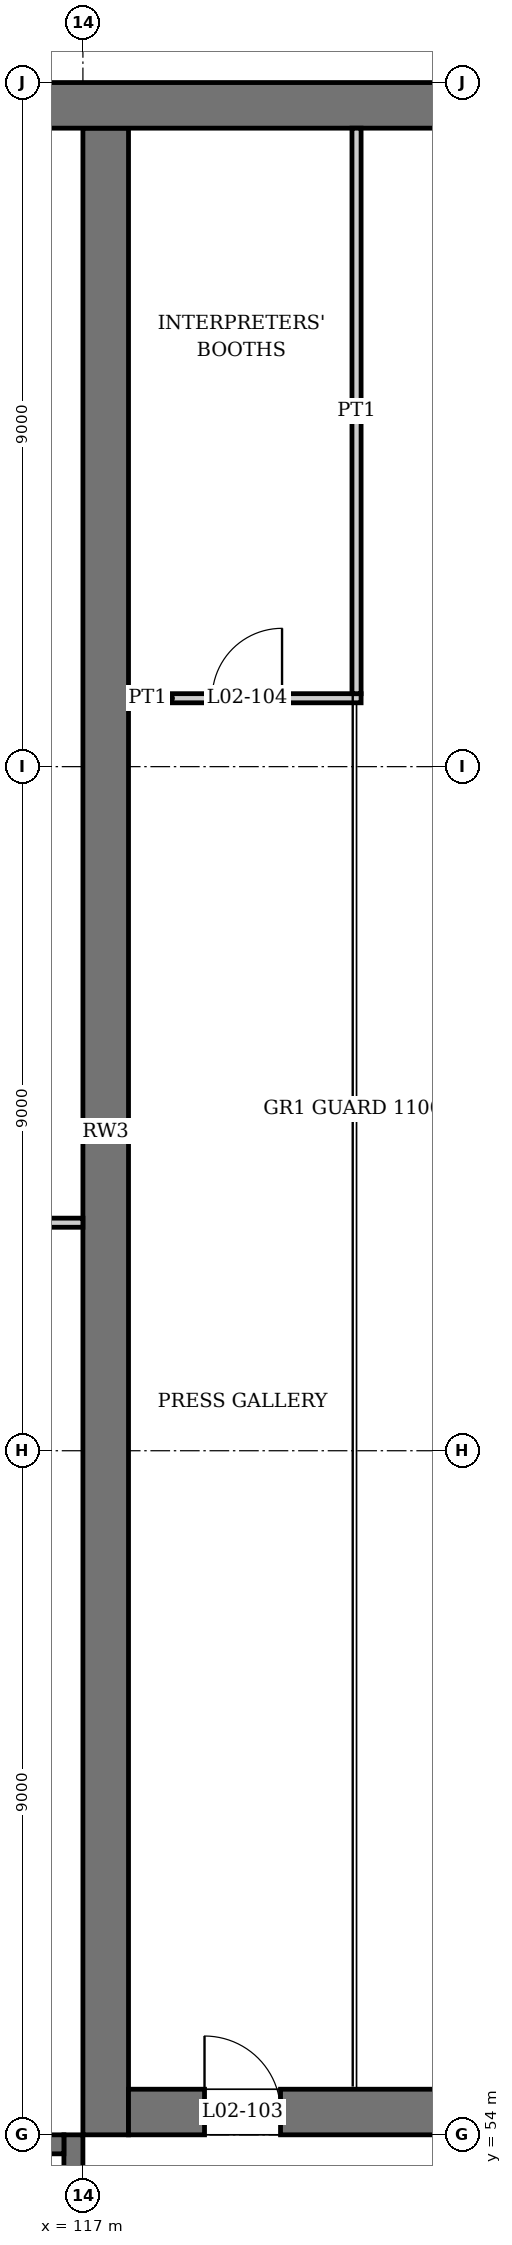
"""IFC4 building model, lengths in metres.
Left out: names, types, materials, properties, quantities, classifications, styles, units other than length and angle.
Written with IfcOpenShell. Run it as: python <this file> out.ifc"""

import sys

from ifc_helpers import new_model, si_unit, direction, frame, frame_2d, origin, place, context, subcontext, project, spatial, rectangle, extrude, element, fill, save


model = new_model("IFC4")
c1 = context("Model", 3, precision=1e-05, world=origin(), true_north=direction((0.0, 1.0)))
c2 = subcontext(c1, "Body", "Model", "MODEL_VIEW")
j1 = project(units=[si_unit("LENGTHUNIT", "METRE"), si_unit("PLANEANGLEUNIT", "RADIAN")], contexts=[c1])
p1 = place(None, origin())
s1 = spatial("IfcSite", under=j1, at=p1, CompositionType="ELEMENT")
p2 = place(p1, origin())
s2 = spatial("IfcBuilding", under=s1, at=p2, CompositionType="ELEMENT")
p3 = place(p2, frame((0.0, 0.0, 10.5)))
s3 = spatial("IfcBuildingStorey", under=s2, at=p3, CompositionType="ELEMENT", Elevation=10.5)
p4 = place(p3, frame((116.875, 45.0, 0.0), z_axis=(0.0, 0.0, 1.0), x_axis=(0.0, 1.0, 0.0)))
e1 = element("IfcWall", 1, at=p4, inside=s3, PredefinedType="SHEAR", context=c2, shape_type="SweptSolid", body=[
    extrude(rectangle(XDim=9.0, YDim=0.25, at=frame_2d((4.5, 0.0))), origin(), (0.0, 0.0, 1.0), 4.35),
])
p5 = place(p4, frame((1.75, 0.0, 0.0)))
e2 = element("IfcOpeningElement", 2, at=p5, cuts=e1, PredefinedType="OPENING", context=c2, shape_type="SweptSolid", body=[
    extrude(rectangle(XDim=1.0, YDim=2.1, at=frame_2d((0.5, 1.05))), frame((0.0, 0.135, 0.0), z_axis=(0.0, -1.0, 0.0), x_axis=(1.0, 0.0, 0.0)), (0.0, 0.0, 1.0), 0.27),
])
p6 = place(p3, frame((108.25, 53.875, 0.0), z_axis=(0.0, 0.0, 1.0), x_axis=(1.0, 0.0, 0.0)))
e3 = element("IfcWall", 3, at=p6, inside=s3, PredefinedType="SHEAR", context=c2, shape_type="SweptSolid", body=[
    extrude(rectangle(XDim=8.5, YDim=0.25, at=frame_2d((4.25, 0.0))), origin(), (0.0, 0.0, 1.0), 4.35),
])
p7 = place(p3, frame((117.3, 54.0, 0.0), z_axis=(0.0, 0.0, 1.0), x_axis=(0.0, 1.0, 0.0)))
e4 = element("IfcWall", 4, at=p7, inside=s3, PredefinedType="SHEAR", context=c2, shape_type="SweptSolid", body=[
    extrude(rectangle(XDim=26.4, YDim=0.6, at=frame_2d((13.2, 0.0))), origin(), (0.0, 0.0, 1.0), 4.5),
])
p8 = place(p3, frame((117.6, 54.3, 0.0), z_axis=(0.0, 0.0, 1.0), x_axis=(1.0, 0.0, 0.0)))
e5 = element("IfcWall", 5, at=p8, inside=s3, PredefinedType="SHEAR", context=c2, shape_type="SweptSolid", body=[
    extrude(rectangle(XDim=25.8, YDim=0.6, at=frame_2d((12.9, 0.0))), origin(), (0.0, 0.0, 1.0), 4.5),
])
p9 = place(p8, frame((1.0, 0.0, 0.0)))
e6 = element("IfcOpeningElement", 6, at=p9, cuts=e5, PredefinedType="OPENING", context=c2, shape_type="SweptSolid", body=[
    extrude(rectangle(XDim=1.0, YDim=2.1, at=frame_2d((0.5, 1.05))), frame((0.0, 0.31, 0.0), z_axis=(0.0, -1.0, 0.0), x_axis=(1.0, 0.0, 0.0)), (0.0, 0.0, 1.0), 0.62),
])
p10 = place(p3, frame((0.0, 80.7, 0.0), z_axis=(0.0, 0.0, 1.0), x_axis=(1.0, 0.0, 0.0)))
e7 = element("IfcWall", 7, at=p10, inside=s3, PredefinedType="SHEAR", context=c2, shape_type="SweptSolid", body=[
    extrude(rectangle(XDim=180.0, YDim=0.6, at=frame_2d((90.0, 0.0))), origin(), (0.0, 0.0, 1.0), 4.35),
])
p11 = place(p10, frame((1.35, 0.0, 0.9)))
e8 = element("IfcOpeningElement", 8, at=p11, cuts=e7, PredefinedType="OPENING", context=c2, shape_type="SweptSolid", body=[
    extrude(rectangle(XDim=1.8, YDim=1.5, at=frame_2d((0.9, 0.75))), frame((0.0, 0.31, 0.0), z_axis=(0.0, -1.0, 0.0), x_axis=(1.0, 0.0, 0.0)), (0.0, 0.0, 1.0), 0.62),
])
p12 = place(p10, frame((5.85, 0.0, 0.9)))
e9 = element("IfcOpeningElement", 9, at=p12, cuts=e7, PredefinedType="OPENING", context=c2, shape_type="SweptSolid", body=[
    extrude(rectangle(XDim=1.8, YDim=1.5, at=frame_2d((0.9, 0.75))), frame((0.0, 0.31, 0.0), z_axis=(0.0, -1.0, 0.0), x_axis=(1.0, 0.0, 0.0)), (0.0, 0.0, 1.0), 0.62),
])
p13 = place(p10, frame((10.35, 0.0, 0.9)))
e10 = element("IfcOpeningElement", 10, at=p13, cuts=e7, PredefinedType="OPENING", context=c2, shape_type="SweptSolid", body=[
    extrude(rectangle(XDim=1.8, YDim=1.5, at=frame_2d((0.9, 0.75))), frame((0.0, 0.31, 0.0), z_axis=(0.0, -1.0, 0.0), x_axis=(1.0, 0.0, 0.0)), (0.0, 0.0, 1.0), 0.62),
])
p14 = place(p10, frame((14.85, 0.0, 0.9)))
e11 = element("IfcOpeningElement", 11, at=p14, cuts=e7, PredefinedType="OPENING", context=c2, shape_type="SweptSolid", body=[
    extrude(rectangle(XDim=1.8, YDim=1.5, at=frame_2d((0.9, 0.75))), frame((0.0, 0.31, 0.0), z_axis=(0.0, -1.0, 0.0), x_axis=(1.0, 0.0, 0.0)), (0.0, 0.0, 1.0), 0.62),
])
p15 = place(p10, frame((19.35, 0.0, 0.9)))
e12 = element("IfcOpeningElement", 12, at=p15, cuts=e7, PredefinedType="OPENING", context=c2, shape_type="SweptSolid", body=[
    extrude(rectangle(XDim=1.8, YDim=1.5, at=frame_2d((0.9, 0.75))), frame((0.0, 0.31, 0.0), z_axis=(0.0, -1.0, 0.0), x_axis=(1.0, 0.0, 0.0)), (0.0, 0.0, 1.0), 0.62),
])
p16 = place(p10, frame((23.85, 0.0, 0.9)))
e13 = element("IfcOpeningElement", 13, at=p16, cuts=e7, PredefinedType="OPENING", context=c2, shape_type="SweptSolid", body=[
    extrude(rectangle(XDim=1.8, YDim=1.5, at=frame_2d((0.9, 0.75))), frame((0.0, 0.31, 0.0), z_axis=(0.0, -1.0, 0.0), x_axis=(1.0, 0.0, 0.0)), (0.0, 0.0, 1.0), 0.62),
])
p17 = place(p10, frame((36.45, 0.0, 2.4)))
e14 = element("IfcOpeningElement", 14, at=p17, cuts=e7, PredefinedType="OPENING", context=c2, shape_type="SweptSolid", body=[
    extrude(rectangle(XDim=3.6, YDim=1.0, at=frame_2d((1.8, 0.5))), frame((0.0, 0.31, 0.0), z_axis=(0.0, -1.0, 0.0), x_axis=(1.0, 0.0, 0.0)), (0.0, 0.0, 1.0), 0.62),
])
p18 = place(p10, frame((40.95, 0.0, 2.4)))
e15 = element("IfcOpeningElement", 15, at=p18, cuts=e7, PredefinedType="OPENING", context=c2, shape_type="SweptSolid", body=[
    extrude(rectangle(XDim=3.6, YDim=1.0, at=frame_2d((1.8, 0.5))), frame((0.0, 0.31, 0.0), z_axis=(0.0, -1.0, 0.0), x_axis=(1.0, 0.0, 0.0)), (0.0, 0.0, 1.0), 0.62),
])
p19 = place(p10, frame((45.45, 0.0, 2.4)))
e16 = element("IfcOpeningElement", 16, at=p19, cuts=e7, PredefinedType="OPENING", context=c2, shape_type="SweptSolid", body=[
    extrude(rectangle(XDim=3.6, YDim=1.0, at=frame_2d((1.8, 0.5))), frame((0.0, 0.31, 0.0), z_axis=(0.0, -1.0, 0.0), x_axis=(1.0, 0.0, 0.0)), (0.0, 0.0, 1.0), 0.62),
])
p20 = place(p10, frame((49.95, 0.0, 2.4)))
e17 = element("IfcOpeningElement", 17, at=p20, cuts=e7, PredefinedType="OPENING", context=c2, shape_type="SweptSolid", body=[
    extrude(rectangle(XDim=3.6, YDim=1.0, at=frame_2d((1.8, 0.5))), frame((0.0, 0.31, 0.0), z_axis=(0.0, -1.0, 0.0), x_axis=(1.0, 0.0, 0.0)), (0.0, 0.0, 1.0), 0.62),
])
p21 = place(p10, frame((55.65, 0.0, 1.2)))
e18 = element("IfcOpeningElement", 18, at=p21, cuts=e7, PredefinedType="OPENING", context=c2, shape_type="SweptSolid", body=[
    extrude(rectangle(XDim=1.2, YDim=1.2, at=frame_2d((0.6, 0.6))), frame((0.0, 0.31, 0.0), z_axis=(0.0, -1.0, 0.0), x_axis=(1.0, 0.0, 0.0)), (0.0, 0.0, 1.0), 0.62),
])
p22 = place(p10, frame((60.15, 0.0, 1.2)))
e19 = element("IfcOpeningElement", 19, at=p22, cuts=e7, PredefinedType="OPENING", context=c2, shape_type="SweptSolid", body=[
    extrude(rectangle(XDim=1.2, YDim=1.2, at=frame_2d((0.6, 0.6))), frame((0.0, 0.31, 0.0), z_axis=(0.0, -1.0, 0.0), x_axis=(1.0, 0.0, 0.0)), (0.0, 0.0, 1.0), 0.62),
])
p23 = place(p10, frame((63.45, 0.0, 2.4)))
e20 = element("IfcOpeningElement", 20, at=p23, cuts=e7, PredefinedType="OPENING", context=c2, shape_type="SweptSolid", body=[
    extrude(rectangle(XDim=3.6, YDim=1.0, at=frame_2d((1.8, 0.5))), frame((0.0, 0.31, 0.0), z_axis=(0.0, -1.0, 0.0), x_axis=(1.0, 0.0, 0.0)), (0.0, 0.0, 1.0), 0.62),
])
p24 = place(p10, frame((67.95, 0.0, 2.4)))
e21 = element("IfcOpeningElement", 21, at=p24, cuts=e7, PredefinedType="OPENING", context=c2, shape_type="SweptSolid", body=[
    extrude(rectangle(XDim=3.6, YDim=1.0, at=frame_2d((1.8, 0.5))), frame((0.0, 0.31, 0.0), z_axis=(0.0, -1.0, 0.0), x_axis=(1.0, 0.0, 0.0)), (0.0, 0.0, 1.0), 0.62),
])
p25 = place(p10, frame((72.45, 0.0, 2.4)))
e22 = element("IfcOpeningElement", 22, at=p25, cuts=e7, PredefinedType="OPENING", context=c2, shape_type="SweptSolid", body=[
    extrude(rectangle(XDim=3.6, YDim=1.0, at=frame_2d((1.8, 0.5))), frame((0.0, 0.31, 0.0), z_axis=(0.0, -1.0, 0.0), x_axis=(1.0, 0.0, 0.0)), (0.0, 0.0, 1.0), 0.62),
])
p26 = place(p10, frame((76.95, 0.0, 2.4)))
e23 = element("IfcOpeningElement", 23, at=p26, cuts=e7, PredefinedType="OPENING", context=c2, shape_type="SweptSolid", body=[
    extrude(rectangle(XDim=3.6, YDim=1.0, at=frame_2d((1.8, 0.5))), frame((0.0, 0.31, 0.0), z_axis=(0.0, -1.0, 0.0), x_axis=(1.0, 0.0, 0.0)), (0.0, 0.0, 1.0), 0.62),
])
p27 = place(p10, frame((91.8, 0.0, 1.7)))
e24 = element("IfcOpeningElement", 24, at=p27, cuts=e7, PredefinedType="OPENING", context=c2, shape_type="SweptSolid", body=[
    extrude(rectangle(XDim=0.9, YDim=0.6, at=frame_2d((0.45, 0.3))), frame((0.0, 0.31, 0.0), z_axis=(0.0, -1.0, 0.0), x_axis=(1.0, 0.0, 0.0)), (0.0, 0.0, 1.0), 0.62),
])
p28 = place(p10, frame((96.3, 0.0, 1.7)))
e25 = element("IfcOpeningElement", 25, at=p28, cuts=e7, PredefinedType="OPENING", context=c2, shape_type="SweptSolid", body=[
    extrude(rectangle(XDim=0.9, YDim=0.6, at=frame_2d((0.45, 0.3))), frame((0.0, 0.31, 0.0), z_axis=(0.0, -1.0, 0.0), x_axis=(1.0, 0.0, 0.0)), (0.0, 0.0, 1.0), 0.62),
])
p29 = place(p10, frame((100.35, 0.0, 0.9)))
e26 = element("IfcOpeningElement", 26, at=p29, cuts=e7, PredefinedType="OPENING", context=c2, shape_type="SweptSolid", body=[
    extrude(rectangle(XDim=1.8, YDim=1.5, at=frame_2d((0.9, 0.75))), frame((0.0, 0.31, 0.0), z_axis=(0.0, -1.0, 0.0), x_axis=(1.0, 0.0, 0.0)), (0.0, 0.0, 1.0), 0.62),
])
p30 = place(p10, frame((104.85, 0.0, 0.9)))
e27 = element("IfcOpeningElement", 27, at=p30, cuts=e7, PredefinedType="OPENING", context=c2, shape_type="SweptSolid", body=[
    extrude(rectangle(XDim=1.8, YDim=1.5, at=frame_2d((0.9, 0.75))), frame((0.0, 0.31, 0.0), z_axis=(0.0, -1.0, 0.0), x_axis=(1.0, 0.0, 0.0)), (0.0, 0.0, 1.0), 0.62),
])
p31 = place(p10, frame((109.35, 0.0, 0.9)))
e28 = element("IfcOpeningElement", 28, at=p31, cuts=e7, PredefinedType="OPENING", context=c2, shape_type="SweptSolid", body=[
    extrude(rectangle(XDim=1.8, YDim=1.5, at=frame_2d((0.9, 0.75))), frame((0.0, 0.31, 0.0), z_axis=(0.0, -1.0, 0.0), x_axis=(1.0, 0.0, 0.0)), (0.0, 0.0, 1.0), 0.62),
])
p32 = place(p10, frame((113.85, 0.0, 0.9)))
e29 = element("IfcOpeningElement", 29, at=p32, cuts=e7, PredefinedType="OPENING", context=c2, shape_type="SweptSolid", body=[
    extrude(rectangle(XDim=1.8, YDim=1.5, at=frame_2d((0.9, 0.75))), frame((0.0, 0.31, 0.0), z_axis=(0.0, -1.0, 0.0), x_axis=(1.0, 0.0, 0.0)), (0.0, 0.0, 1.0), 0.62),
])
p33 = place(p10, frame((154.8, 0.0, 1.7)))
e30 = element("IfcOpeningElement", 30, at=p33, cuts=e7, PredefinedType="OPENING", context=c2, shape_type="SweptSolid", body=[
    extrude(rectangle(XDim=0.9, YDim=0.6, at=frame_2d((0.45, 0.3))), frame((0.0, 0.31, 0.0), z_axis=(0.0, -1.0, 0.0), x_axis=(1.0, 0.0, 0.0)), (0.0, 0.0, 1.0), 0.62),
])
p34 = place(p10, frame((159.3, 0.0, 1.7)))
e31 = element("IfcOpeningElement", 31, at=p34, cuts=e7, PredefinedType="OPENING", context=c2, shape_type="SweptSolid", body=[
    extrude(rectangle(XDim=0.9, YDim=0.6, at=frame_2d((0.45, 0.3))), frame((0.0, 0.31, 0.0), z_axis=(0.0, -1.0, 0.0), x_axis=(1.0, 0.0, 0.0)), (0.0, 0.0, 1.0), 0.62),
])
p35 = place(p10, frame((163.05, 0.0, 0.9)))
e32 = element("IfcOpeningElement", 32, at=p35, cuts=e7, PredefinedType="OPENING", context=c2, shape_type="SweptSolid", body=[
    extrude(rectangle(XDim=2.4, YDim=2.1, at=frame_2d((1.2, 1.05))), frame((0.0, 0.31, 0.0), z_axis=(0.0, -1.0, 0.0), x_axis=(1.0, 0.0, 0.0)), (0.0, 0.0, 1.0), 0.62),
])
p36 = place(p10, frame((167.55, 0.0, 0.9)))
e33 = element("IfcOpeningElement", 33, at=p36, cuts=e7, PredefinedType="OPENING", context=c2, shape_type="SweptSolid", body=[
    extrude(rectangle(XDim=2.4, YDim=2.1, at=frame_2d((1.2, 1.05))), frame((0.0, 0.31, 0.0), z_axis=(0.0, -1.0, 0.0), x_axis=(1.0, 0.0, 0.0)), (0.0, 0.0, 1.0), 0.62),
])
p37 = place(p10, frame((94.05, 0.0, 1.7)))
e34 = element("IfcOpeningElement", 34, at=p37, cuts=e7, PredefinedType="OPENING", context=c2, shape_type="SweptSolid", body=[
    extrude(rectangle(XDim=0.9, YDim=0.6, at=frame_2d((0.45, 0.3))), frame((0.0, 0.31, 0.0), z_axis=(0.0, -1.0, 0.0), x_axis=(1.0, 0.0, 0.0)), (0.0, 0.0, 1.0), 0.62),
])
p38 = place(p10, frame((157.05, 0.0, 1.7)))
e35 = element("IfcOpeningElement", 35, at=p38, cuts=e7, PredefinedType="OPENING", context=c2, shape_type="SweptSolid", body=[
    extrude(rectangle(XDim=0.9, YDim=0.6, at=frame_2d((0.45, 0.3))), frame((0.0, 0.31, 0.0), z_axis=(0.0, -1.0, 0.0), x_axis=(1.0, 0.0, 0.0)), (0.0, 0.0, 1.0), 0.62),
])
p39 = place(p3, frame((99.1, 66.0, 0.0), z_axis=(0.0, 0.0, 1.0), x_axis=(1.0, 0.0, 0.0)))
e36 = element("IfcWall", 36, at=p39, inside=s3, PredefinedType="PARTITIONING", context=c2, shape_type="SweptSolid", body=[
    extrude(rectangle(XDim=17.9, YDim=0.12, at=frame_2d((8.95, 0.0))), origin(), (0.0, 0.0, 1.0), 3.65),
])
p40 = place(p3, frame((117.6, 72.9, 0.0), z_axis=(0.0, 0.0, 1.0), x_axis=(1.0, 0.0, 0.0)))
e37 = element("IfcWall", 37, at=p40, inside=s3, PredefinedType="PARTITIONING", context=c2, shape_type="SweptSolid", body=[
    extrude(rectangle(XDim=3.06, YDim=0.12, at=frame_2d((1.53, 0.0))), origin(), (0.0, 0.0, 1.0), 7.1),
])
p41 = place(p40, frame((1.1, 0.0, 0.0)))
e38 = element("IfcOpeningElement", 38, at=p41, cuts=e37, PredefinedType="OPENING", context=c2, shape_type="SweptSolid", body=[
    extrude(rectangle(XDim=0.92, YDim=2.1, at=frame_2d((0.46, 1.05))), frame((0.0, 0.07, 0.0), z_axis=(0.0, -1.0, 0.0), x_axis=(1.0, 0.0, 0.0)), (0.0, 0.0, 1.0), 0.14),
])
p42 = place(p3, frame((120.6, 72.96, 0.0), z_axis=(0.0, 0.0, 1.0), x_axis=(0.0, 1.0, 0.0)))
e39 = element("IfcWall", 39, at=p42, inside=s3, PredefinedType="PARTITIONING", context=c2, shape_type="SweptSolid", body=[
    extrude(rectangle(XDim=7.44, YDim=0.12, at=frame_2d((3.72, 0.0))), origin(), (0.0, 0.0, 1.0), 7.1),
])
p43 = place(p9, origin())
e40 = element("IfcDoor", 40, at=p43, inside=s3, OperationType="SINGLE_SWING_LEFT", PredefinedType="DOOR", context=c2, shape_type="SweptSolid", body=[
    extrude(rectangle(XDim=1.0, YDim=2.1, at=frame_2d((0.5, 1.05))), frame((0.0, 0.025, 0.0), z_axis=(0.0, -1.0, 0.0), x_axis=(1.0, 0.0, 0.0)), (0.0, 0.0, 1.0), 0.05),
])
fill(e6, e40)
p44 = place(p41, origin())
e41 = element("IfcDoor", 41, at=p44, inside=s3, OperationType="SINGLE_SWING_RIGHT", PredefinedType="DOOR", context=c2, shape_type="SweptSolid", body=[
    extrude(rectangle(XDim=0.92, YDim=2.1, at=frame_2d((0.46, 1.05))), frame((0.0, 0.025, 0.0), z_axis=(0.0, -1.0, 0.0), x_axis=(1.0, 0.0, 0.0)), (0.0, 0.0, 1.0), 0.05),
])
fill(e38, e41)
save(model, sys.argv[1])
